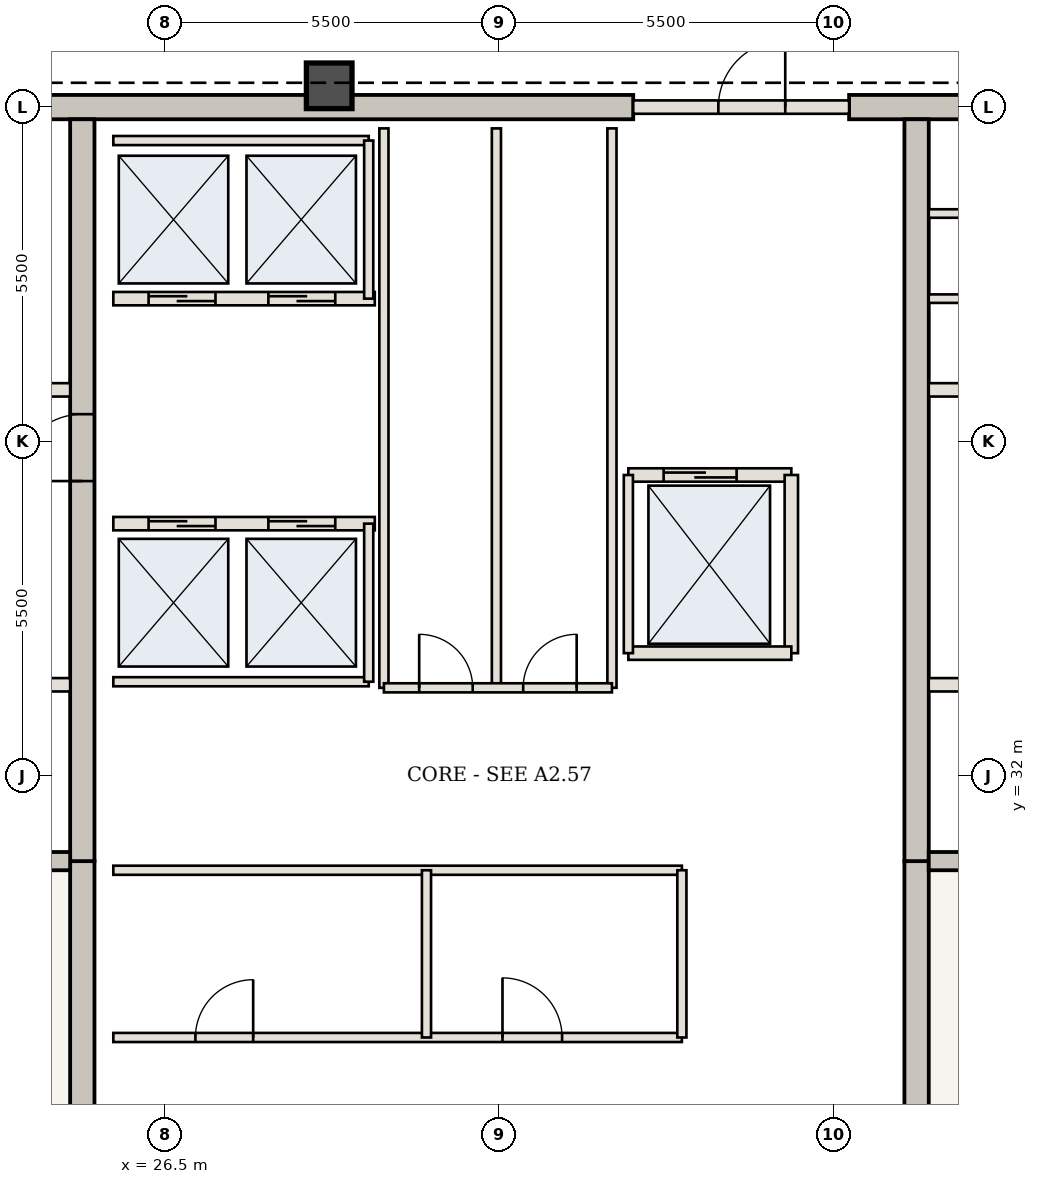
"""IFC4 building model, lengths in metres.
Left out: names, types, materials, properties, quantities, classifications, styles, units other than length and angle.
Written with IfcOpenShell. Run it as: python <this file> out.ifc"""

import sys

from ifc_helpers import new_model, si_unit, direction, frame, frame_2d, origin, origin_2d, place, context, subcontext, project, spatial, rectangle, extrude, element, fill, save


model = new_model("IFC4")
c1 = context("Model", 3, precision=1e-05, world=origin(), true_north=direction((0.0, 1.0)))
c2 = subcontext(c1, "Body", "Model", "MODEL_VIEW")
j1 = project(units=[si_unit("LENGTHUNIT", "METRE"), si_unit("PLANEANGLEUNIT", "RADIAN")], contexts=[c1])
p1 = place(None, origin())
s1 = spatial("IfcSite", under=j1, at=p1, CompositionType="ELEMENT")
p2 = place(p1, origin())
s2 = spatial("IfcBuilding", under=s1, at=p2, CompositionType="ELEMENT")
p3 = place(p2, frame((0.0, 0.0, 257.6)))
s3 = spatial("IfcBuildingStorey", under=s2, at=p3, CompositionType="ELEMENT", Elevation=257.6)
p4 = place(p3, frame((21.41, 43.0, 0.0), z_axis=(0.0, 0.0, 1.0), x_axis=(1.0, 0.0, 0.0)))
e1 = element("IfcWall", 1, at=p4, inside=s3, PredefinedType="SHEAR", context=c2, shape_type="SweptSolid", body=[
    extrude(rectangle(XDim=12.79, YDim=0.4, at=frame_2d((6.395, 0.0))), origin(), (0.0, 0.0, 1.0), 4.55),
])
p5 = place(p3, frame((37.75, 43.0, 0.0), z_axis=(0.0, 0.0, 1.0), x_axis=(1.0, 0.0, 0.0)))
e2 = element("IfcWall", 2, at=p5, inside=s3, PredefinedType="SHEAR", context=c2, shape_type="SweptSolid", body=[
    extrude(rectangle(XDim=4.84, YDim=0.4, at=frame_2d((2.42, 0.0))), origin(), (0.0, 0.0, 1.0), 4.55),
])
p6 = place(p3, frame((25.14, 21.15, 0.0), z_axis=(0.0, 0.0, 1.0), x_axis=(0.0, 1.0, 0.0)))
e3 = element("IfcWall", 3, at=p6, inside=s3, PredefinedType="SHEAR", context=c2, shape_type="SweptSolid", body=[
    extrude(rectangle(XDim=9.45, YDim=0.4, at=frame_2d((4.725, 0.0))), origin(), (0.0, 0.0, 1.0), 4.55),
])
p7 = place(p3, frame((25.14, 30.6, 0.0), z_axis=(0.0, 0.0, 1.0), x_axis=(0.0, 1.0, 0.0)))
e4 = element("IfcWall", 4, at=p7, inside=s3, PredefinedType="SHEAR", context=c2, shape_type="SweptSolid", body=[
    extrude(rectangle(XDim=12.2, YDim=0.4, at=frame_2d((6.1, 0.0))), origin(), (0.0, 0.0, 1.0), 4.55),
])
p8 = place(p7, frame((6.25, 0.0, 0.0)))
e5 = element("IfcOpeningElement", 5, at=p8, cuts=e4, PredefinedType="OPENING", context=c2, shape_type="SweptSolid", body=[
    extrude(rectangle(XDim=1.1, YDim=2.15, at=frame_2d((0.55, 1.075))), frame((0.0, 0.21, 0.0), z_axis=(0.0, -1.0, 0.0), x_axis=(1.0, 0.0, 0.0)), (0.0, 0.0, 1.0), 0.42),
])
p9 = place(p3, frame((38.86, 21.15, 0.0), z_axis=(0.0, 0.0, 1.0), x_axis=(0.0, 1.0, 0.0)))
e6 = element("IfcWall", 6, at=p9, inside=s3, PredefinedType="SHEAR", context=c2, shape_type="SweptSolid", body=[
    extrude(rectangle(XDim=9.45, YDim=0.4, at=frame_2d((4.725, 0.0))), origin(), (0.0, 0.0, 1.0), 4.55),
])
p10 = place(p3, frame((38.86, 30.6, 0.0), z_axis=(0.0, 0.0, 1.0), x_axis=(0.0, 1.0, 0.0)))
e7 = element("IfcWall", 7, at=p10, inside=s3, PredefinedType="SHEAR", context=c2, shape_type="SweptSolid", body=[
    extrude(rectangle(XDim=12.2, YDim=0.4, at=frame_2d((6.1, 0.0))), origin(), (0.0, 0.0, 1.0), 4.55),
])
p11 = place(p3, frame((29.2, 43.35, 0.0), z_axis=(0.0, 0.0, 1.0), x_axis=(1.0, 0.0, 0.0)))
e8 = element("IfcColumn", 8, at=p11, inside=s3, PredefinedType="COLUMN", context=c2, shape_type="SweptSolid", body=[
    extrude(rectangle(XDim=0.75, YDim=0.75, at=origin_2d()), origin(), (0.0, 0.0, 1.0), 4.55),
])
for number, where, z_axis, x_axis in (
    (9, (21.41, 30.6, 0.0), (0.0, 0.0, 1.0), (1.0, 0.0, 0.0)),
    (10, (39.06, 30.6, 0.0), (0.0, 0.0, 1.0), (1.0, 0.0, 0.0)),
):
    element("IfcWall", number, at=place(p3, frame(where, z_axis=z_axis, x_axis=x_axis)), inside=s3, PredefinedType="SHEAR", context=c2, shape_type="SweptSolid", body=[
        extrude(rectangle(XDim=3.53, YDim=0.3, at=frame_2d((1.765, 0.0))), origin(), (0.0, 0.0, 1.0), 4.13),
    ])
p12 = place(p3, frame((21.41, 33.5, 0.0), z_axis=(0.0, 0.0, 1.0), x_axis=(1.0, 0.0, 0.0)))
e11 = element("IfcWall", 11, at=p12, inside=s3, PredefinedType="STANDARD", context=c2, shape_type="SweptSolid", body=[
    extrude(rectangle(XDim=3.53, YDim=0.22, at=frame_2d((1.765, 0.0))), origin(), (0.0, 0.0, 1.0), 4.13),
])
p13 = place(p12, frame((0.75, 0.0, 0.0)))
e12 = element("IfcOpeningElement", 12, at=p13, cuts=e11, PredefinedType="OPENING", context=c2, shape_type="SweptSolid", body=[
    extrude(rectangle(XDim=1.2, YDim=2.2, at=frame_2d((0.6, 1.1))), frame((0.0, 0.12, 0.0), z_axis=(0.0, -1.0, 0.0), x_axis=(1.0, 0.0, 0.0)), (0.0, 0.0, 1.0), 0.24),
])
p14 = place(p3, frame((39.06, 33.5, 0.0), z_axis=(0.0, 0.0, 1.0), x_axis=(1.0, 0.0, 0.0)))
e13 = element("IfcWall", 13, at=p14, inside=s3, PredefinedType="STANDARD", context=c2, shape_type="SweptSolid", body=[
    extrude(rectangle(XDim=3.53, YDim=0.22, at=frame_2d((1.765, 0.0))), origin(), (0.0, 0.0, 1.0), 4.13),
])
p15 = place(p14, frame((1.55, 0.0, 0.0)))
e14 = element("IfcOpeningElement", 14, at=p15, cuts=e13, PredefinedType="OPENING", context=c2, shape_type="SweptSolid", body=[
    extrude(rectangle(XDim=1.2, YDim=2.2, at=frame_2d((0.6, 1.1))), frame((0.0, 0.12, 0.0), z_axis=(0.0, -1.0, 0.0), x_axis=(1.0, 0.0, 0.0)), (0.0, 0.0, 1.0), 0.24),
])
for number, where, z_axis, x_axis in (
    (15, (21.41, 38.35, 0.0), (0.0, 0.0, 1.0), (1.0, 0.0, 0.0)),
    (16, (39.06, 38.35, 0.0), (0.0, 0.0, 1.0), (1.0, 0.0, 0.0)),
):
    element("IfcWall", number, at=place(p3, frame(where, z_axis=z_axis, x_axis=x_axis)), inside=s3, PredefinedType="STANDARD", context=c2, shape_type="SweptSolid", body=[
        extrude(rectangle(XDim=3.53, YDim=0.22, at=frame_2d((1.765, 0.0))), origin(), (0.0, 0.0, 1.0), 4.13),
    ])
for number, where, z_axis, x_axis in (
    (17, (39.06, 39.85, 0.0), (0.0, 0.0, 1.0), (1.0, 0.0, 0.0)),
    (18, (39.06, 41.25, 0.0), (0.0, 0.0, 1.0), (1.0, 0.0, 0.0)),
):
    element("IfcWall", number, at=place(p3, frame(where, z_axis=z_axis, x_axis=x_axis)), inside=s3, PredefinedType="STANDARD", context=c2, shape_type="SweptSolid", body=[
        extrude(rectangle(XDim=3.53, YDim=0.14, at=frame_2d((1.765, 0.0))), origin(), (0.0, 0.0, 1.0), 4.13),
    ])
p16 = place(p3, frame((25.65, 27.7, 0.0), z_axis=(0.0, 0.0, 1.0), x_axis=(1.0, 0.0, 0.0)))
e19 = element("IfcWall", 19, at=p16, inside=s3, PredefinedType="STANDARD", context=c2, shape_type="SweptSolid", body=[
    extrude(rectangle(XDim=9.35, YDim=0.15, at=frame_2d((4.675, 0.0))), origin(), (0.0, 0.0, 1.0), 4.13),
])
p17 = place(p16, frame((1.35, 0.0, 0.0)))
e20 = element("IfcOpeningElement", 20, at=p17, cuts=e19, PredefinedType="OPENING", context=c2, shape_type="SweptSolid", body=[
    extrude(rectangle(XDim=0.95, YDim=2.15, at=frame_2d((0.475, 1.075))), frame((0.0, 0.085, 0.0), z_axis=(0.0, -1.0, 0.0), x_axis=(1.0, 0.0, 0.0)), (0.0, 0.0, 1.0), 0.17),
])
p18 = place(p16, frame((6.4, 0.0, 0.0)))
e21 = element("IfcOpeningElement", 21, at=p18, cuts=e19, PredefinedType="OPENING", context=c2, shape_type="SweptSolid", body=[
    extrude(rectangle(XDim=0.98, YDim=2.2, at=frame_2d((0.49, 1.1))), frame((0.0, 0.085, 0.0), z_axis=(0.0, -1.0, 0.0), x_axis=(1.0, 0.0, 0.0)), (0.0, 0.0, 1.0), 0.17),
])
p19 = place(p3, frame((25.65, 30.45, 0.0), z_axis=(0.0, 0.0, 1.0), x_axis=(1.0, 0.0, 0.0)))
e22 = element("IfcWall", 22, at=p19, inside=s3, PredefinedType="STANDARD", context=c2, shape_type="SweptSolid", body=[
    extrude(rectangle(XDim=9.35, YDim=0.15, at=frame_2d((4.675, 0.0))), origin(), (0.0, 0.0, 1.0), 4.13),
])
for number, where, z_axis, x_axis in (
    (23, (30.8, 27.7, 0.0), (0.0, 0.0, 1.0), (0.0, 1.0, 0.0)),
    (24, (35.0, 27.7, 0.0), (0.0, 0.0, 1.0), (0.0, 1.0, 0.0)),
):
    element("IfcWall", number, at=place(p3, frame(where, z_axis=z_axis, x_axis=x_axis)), inside=s3, PredefinedType="STANDARD", context=c2, shape_type="SweptSolid", body=[
        extrude(rectangle(XDim=2.75, YDim=0.15, at=frame_2d((1.375, 0.0))), origin(), (0.0, 0.0, 1.0), 4.13),
    ])
p20 = place(p3, frame((25.65, 36.15, 0.0), z_axis=(0.0, 0.0, 1.0), x_axis=(1.0, 0.0, 0.0)))
e25 = element("IfcWall", 25, at=p20, inside=s3, PredefinedType="STANDARD", context=c2, shape_type="SweptSolid", body=[
    extrude(rectangle(XDim=4.3, YDim=0.22, at=frame_2d((2.15, 0.0))), origin(), (0.0, 0.0, 1.0), 4.13),
])
p21 = place(p20, frame((0.58, 0.0, 0.0)))
e26 = element("IfcOpeningElement", 26, at=p21, cuts=e25, PredefinedType="OPENING", context=c2, shape_type="SweptSolid", body=[
    extrude(rectangle(XDim=1.1, YDim=2.15, at=frame_2d((0.55, 1.075))), frame((0.0, 0.12, 0.0), z_axis=(0.0, -1.0, 0.0), x_axis=(1.0, 0.0, 0.0)), (0.0, 0.0, 1.0), 0.24),
])
p22 = place(p20, frame((2.55, 0.0, 0.0)))
e27 = element("IfcOpeningElement", 27, at=p22, cuts=e25, PredefinedType="OPENING", context=c2, shape_type="SweptSolid", body=[
    extrude(rectangle(XDim=1.1, YDim=2.15, at=frame_2d((0.55, 1.075))), frame((0.0, 0.12, 0.0), z_axis=(0.0, -1.0, 0.0), x_axis=(1.0, 0.0, 0.0)), (0.0, 0.0, 1.0), 0.24),
])
p23 = place(p3, frame((25.65, 33.55, 0.0), z_axis=(0.0, 0.0, 1.0), x_axis=(1.0, 0.0, 0.0)))
e28 = element("IfcWall", 28, at=p23, inside=s3, PredefinedType="STANDARD", context=c2, shape_type="SweptSolid", body=[
    extrude(rectangle(XDim=4.2, YDim=0.15, at=frame_2d((2.1, 0.0))), origin(), (0.0, 0.0, 1.0), 4.13),
])
p24 = place(p3, frame((29.85, 33.55, 0.0), z_axis=(0.0, 0.0, 1.0), x_axis=(0.0, 1.0, 0.0)))
e29 = element("IfcWall", 29, at=p24, inside=s3, PredefinedType="STANDARD", context=c2, shape_type="SweptSolid", body=[
    extrude(rectangle(XDim=2.6, YDim=0.15, at=frame_2d((1.3, 0.0))), origin(), (0.0, 0.0, 1.0), 4.13),
])
p25 = place(p3, frame((25.65, 39.85, 0.0), z_axis=(0.0, 0.0, 1.0), x_axis=(1.0, 0.0, 0.0)))
e30 = element("IfcWall", 30, at=p25, inside=s3, PredefinedType="STANDARD", context=c2, shape_type="SweptSolid", body=[
    extrude(rectangle(XDim=4.3, YDim=0.22, at=frame_2d((2.15, 0.0))), origin(), (0.0, 0.0, 1.0), 4.13),
])
p26 = place(p25, frame((0.58, 0.0, 0.0)))
e31 = element("IfcOpeningElement", 31, at=p26, cuts=e30, PredefinedType="OPENING", context=c2, shape_type="SweptSolid", body=[
    extrude(rectangle(XDim=1.1, YDim=2.15, at=frame_2d((0.55, 1.075))), frame((0.0, 0.12, 0.0), z_axis=(0.0, -1.0, 0.0), x_axis=(1.0, 0.0, 0.0)), (0.0, 0.0, 1.0), 0.24),
])
p27 = place(p25, frame((2.55, 0.0, 0.0)))
e32 = element("IfcOpeningElement", 32, at=p27, cuts=e30, PredefinedType="OPENING", context=c2, shape_type="SweptSolid", body=[
    extrude(rectangle(XDim=1.1, YDim=2.15, at=frame_2d((0.55, 1.075))), frame((0.0, 0.12, 0.0), z_axis=(0.0, -1.0, 0.0), x_axis=(1.0, 0.0, 0.0)), (0.0, 0.0, 1.0), 0.24),
])
p28 = place(p3, frame((25.65, 42.45, 0.0), z_axis=(0.0, 0.0, 1.0), x_axis=(1.0, 0.0, 0.0)))
e33 = element("IfcWall", 33, at=p28, inside=s3, PredefinedType="STANDARD", context=c2, shape_type="SweptSolid", body=[
    extrude(rectangle(XDim=4.2, YDim=0.15, at=frame_2d((2.1, 0.0))), origin(), (0.0, 0.0, 1.0), 4.13),
])
p29 = place(p3, frame((29.85, 39.85, 0.0), z_axis=(0.0, 0.0, 1.0), x_axis=(0.0, 1.0, 0.0)))
e34 = element("IfcWall", 34, at=p29, inside=s3, PredefinedType="STANDARD", context=c2, shape_type="SweptSolid", body=[
    extrude(rectangle(XDim=2.6, YDim=0.15, at=frame_2d((1.3, 0.0))), origin(), (0.0, 0.0, 1.0), 4.13),
])
for number, where, z_axis, x_axis in (
    (35, (30.1, 33.45, 0.0), (0.0, 0.0, 1.0), (0.0, 1.0, 0.0)),
    (36, (31.95, 33.45, 0.0), (0.0, 0.0, 1.0), (0.0, 1.0, 0.0)),
    (37, (33.85, 33.45, 0.0), (0.0, 0.0, 1.0), (0.0, 1.0, 0.0)),
):
    element("IfcWall", number, at=place(p3, frame(where, z_axis=z_axis, x_axis=x_axis)), inside=s3, PredefinedType="STANDARD", context=c2, shape_type="SweptSolid", body=[
        extrude(rectangle(XDim=9.2, YDim=0.15, at=frame_2d((4.6, 0.0))), origin(), (0.0, 0.0, 1.0), 4.13),
    ])
p30 = place(p3, frame((30.1, 33.45, 0.0), z_axis=(0.0, 0.0, 1.0), x_axis=(1.0, 0.0, 0.0)))
e38 = element("IfcWall", 38, at=p30, inside=s3, PredefinedType="STANDARD", context=c2, shape_type="SweptSolid", body=[
    extrude(rectangle(XDim=3.75, YDim=0.15, at=frame_2d((1.875, 0.0))), origin(), (0.0, 0.0, 1.0), 4.13),
])
p31 = place(p30, frame((0.58, 0.0, 0.0)))
e39 = element("IfcOpeningElement", 39, at=p31, cuts=e38, PredefinedType="OPENING", context=c2, shape_type="SweptSolid", body=[
    extrude(rectangle(XDim=0.88, YDim=2.1, at=frame_2d((0.44, 1.05))), frame((0.0, 0.085, 0.0), z_axis=(0.0, -1.0, 0.0), x_axis=(1.0, 0.0, 0.0)), (0.0, 0.0, 1.0), 0.17),
])
p32 = place(p30, frame((2.29, 0.0, 0.0)))
e40 = element("IfcOpeningElement", 40, at=p32, cuts=e38, PredefinedType="OPENING", context=c2, shape_type="SweptSolid", body=[
    extrude(rectangle(XDim=0.88, YDim=2.1, at=frame_2d((0.44, 1.05))), frame((0.0, 0.085, 0.0), z_axis=(0.0, -1.0, 0.0), x_axis=(1.0, 0.0, 0.0)), (0.0, 0.0, 1.0), 0.17),
])
p33 = place(p3, frame((34.2, 43.0, 0.0), z_axis=(0.0, 0.0, 1.0), x_axis=(1.0, 0.0, 0.0)))
e41 = element("IfcWall", 41, at=p33, inside=s3, PredefinedType="STANDARD", context=c2, shape_type="SweptSolid", body=[
    extrude(rectangle(XDim=3.55, YDim=0.22, at=frame_2d((1.775, 0.0))), origin(), (0.0, 0.0, 1.0), 4.13),
])
p34 = place(p33, frame((1.4, 0.0, 0.0)))
e42 = element("IfcOpeningElement", 42, at=p34, cuts=e41, PredefinedType="OPENING", context=c2, shape_type="SweptSolid", body=[
    extrude(rectangle(XDim=1.1, YDim=2.15, at=frame_2d((0.55, 1.075))), frame((0.0, 0.12, 0.0), z_axis=(0.0, -1.0, 0.0), x_axis=(1.0, 0.0, 0.0)), (0.0, 0.0, 1.0), 0.24),
])
p35 = place(p3, frame((34.12, 36.95, 0.0), z_axis=(0.0, 0.0, 1.0), x_axis=(1.0, 0.0, 0.0)))
e43 = element("IfcWall", 43, at=p35, inside=s3, PredefinedType="STANDARD", context=c2, shape_type="SweptSolid", body=[
    extrude(rectangle(XDim=2.68, YDim=0.22, at=frame_2d((1.34, 0.0))), origin(), (0.0, 0.0, 1.0), 4.13),
])
p36 = place(p35, frame((0.58, 0.0, 0.0)))
e44 = element("IfcOpeningElement", 44, at=p36, cuts=e43, PredefinedType="OPENING", context=c2, shape_type="SweptSolid", body=[
    extrude(rectangle(XDim=1.2, YDim=2.2, at=frame_2d((0.6, 1.1))), frame((0.0, 0.12, 0.0), z_axis=(0.0, -1.0, 0.0), x_axis=(1.0, 0.0, 0.0)), (0.0, 0.0, 1.0), 0.24),
])
p37 = place(p3, frame((36.8, 34.02, 0.0), z_axis=(0.0, 0.0, 1.0), x_axis=(0.0, 1.0, 0.0)))
e45 = element("IfcWall", 45, at=p37, inside=s3, PredefinedType="STANDARD", context=c2, shape_type="SweptSolid", body=[
    extrude(rectangle(XDim=2.93, YDim=0.22, at=frame_2d((1.465, 0.0))), origin(), (0.0, 0.0, 1.0), 4.13),
])
p38 = place(p3, frame((34.12, 34.02, 0.0), z_axis=(0.0, 0.0, 1.0), x_axis=(1.0, 0.0, 0.0)))
e46 = element("IfcWall", 46, at=p38, inside=s3, PredefinedType="STANDARD", context=c2, shape_type="SweptSolid", body=[
    extrude(rectangle(XDim=2.68, YDim=0.22, at=frame_2d((1.34, 0.0))), origin(), (0.0, 0.0, 1.0), 4.13),
])
p39 = place(p3, frame((34.12, 34.02, 0.0), z_axis=(0.0, 0.0, 1.0), x_axis=(0.0, 1.0, 0.0)))
e47 = element("IfcWall", 47, at=p39, inside=s3, PredefinedType="STANDARD", context=c2, shape_type="SweptSolid", body=[
    extrude(rectangle(XDim=2.93, YDim=0.15, at=frame_2d((1.465, 0.0))), origin(), (0.0, 0.0, 1.0), 4.13),
])
p40 = place(p8, origin())
e48 = element("IfcDoor", 48, at=p40, inside=s3, OperationType="SINGLE_SWING_LEFT", PredefinedType="DOOR", context=c2, shape_type="SweptSolid", body=[
    extrude(rectangle(XDim=1.1, YDim=2.15, at=frame_2d((0.55, 1.075))), frame((0.0, 0.025, 0.0), z_axis=(0.0, -1.0, 0.0), x_axis=(1.0, 0.0, 0.0)), (0.0, 0.0, 1.0), 0.05),
])
fill(e5, e48)
p41 = place(p17, origin())
e49 = element("IfcDoor", 49, at=p41, inside=s3, OperationType="SINGLE_SWING_RIGHT", PredefinedType="DOOR", context=c2, shape_type="SweptSolid", body=[
    extrude(rectangle(XDim=0.95, YDim=2.15, at=frame_2d((0.475, 1.075))), frame((0.0, 0.025, 0.0), z_axis=(0.0, -1.0, 0.0), x_axis=(1.0, 0.0, 0.0)), (0.0, 0.0, 1.0), 0.05),
])
fill(e20, e49)
p42 = place(p18, origin())
e50 = element("IfcDoor", 50, at=p42, inside=s3, OperationType="SINGLE_SWING_LEFT", PredefinedType="DOOR", context=c2, shape_type="SweptSolid", body=[
    extrude(rectangle(XDim=0.98, YDim=2.2, at=frame_2d((0.49, 1.1))), frame((0.0, 0.025, 0.0), z_axis=(0.0, -1.0, 0.0), x_axis=(1.0, 0.0, 0.0)), (0.0, 0.0, 1.0), 0.05),
])
fill(e21, e50)
p43 = place(p21, origin())
e51 = element("IfcDoor", 51, at=p43, inside=s3, OperationType="DOUBLE_DOOR_SLIDING", PredefinedType="DOOR", context=c2, shape_type="SweptSolid", body=[
    extrude(rectangle(XDim=1.1, YDim=2.15, at=frame_2d((0.55, 1.075))), frame((0.0, 0.025, 0.0), z_axis=(0.0, -1.0, 0.0), x_axis=(1.0, 0.0, 0.0)), (0.0, 0.0, 1.0), 0.05),
])
fill(e26, e51)
p44 = place(p22, origin())
e52 = element("IfcDoor", 52, at=p44, inside=s3, OperationType="DOUBLE_DOOR_SLIDING", PredefinedType="DOOR", context=c2, shape_type="SweptSolid", body=[
    extrude(rectangle(XDim=1.1, YDim=2.15, at=frame_2d((0.55, 1.075))), frame((0.0, 0.025, 0.0), z_axis=(0.0, -1.0, 0.0), x_axis=(1.0, 0.0, 0.0)), (0.0, 0.0, 1.0), 0.05),
])
fill(e27, e52)
p45 = place(p26, origin())
e53 = element("IfcDoor", 53, at=p45, inside=s3, OperationType="DOUBLE_DOOR_SLIDING", PredefinedType="DOOR", context=c2, shape_type="SweptSolid", body=[
    extrude(rectangle(XDim=1.1, YDim=2.15, at=frame_2d((0.55, 1.075))), frame((0.0, 0.025, 0.0), z_axis=(0.0, -1.0, 0.0), x_axis=(1.0, 0.0, 0.0)), (0.0, 0.0, 1.0), 0.05),
])
fill(e31, e53)
p46 = place(p27, origin())
e54 = element("IfcDoor", 54, at=p46, inside=s3, OperationType="DOUBLE_DOOR_SLIDING", PredefinedType="DOOR", context=c2, shape_type="SweptSolid", body=[
    extrude(rectangle(XDim=1.1, YDim=2.15, at=frame_2d((0.55, 1.075))), frame((0.0, 0.025, 0.0), z_axis=(0.0, -1.0, 0.0), x_axis=(1.0, 0.0, 0.0)), (0.0, 0.0, 1.0), 0.05),
])
fill(e32, e54)
p47 = place(p31, origin())
e55 = element("IfcDoor", 55, at=p47, inside=s3, OperationType="SINGLE_SWING_LEFT", PredefinedType="DOOR", context=c2, shape_type="SweptSolid", body=[
    extrude(rectangle(XDim=0.88, YDim=2.1, at=frame_2d((0.44, 1.05))), frame((0.0, 0.025, 0.0), z_axis=(0.0, -1.0, 0.0), x_axis=(1.0, 0.0, 0.0)), (0.0, 0.0, 1.0), 0.05),
])
fill(e39, e55)
p48 = place(p32, origin())
e56 = element("IfcDoor", 56, at=p48, inside=s3, OperationType="SINGLE_SWING_RIGHT", PredefinedType="DOOR", context=c2, shape_type="SweptSolid", body=[
    extrude(rectangle(XDim=0.88, YDim=2.1, at=frame_2d((0.44, 1.05))), frame((0.0, 0.025, 0.0), z_axis=(0.0, -1.0, 0.0), x_axis=(1.0, 0.0, 0.0)), (0.0, 0.0, 1.0), 0.05),
])
fill(e40, e56)
p49 = place(p34, origin())
e57 = element("IfcDoor", 57, at=p49, inside=s3, OperationType="SINGLE_SWING_RIGHT", PredefinedType="DOOR", context=c2, shape_type="SweptSolid", body=[
    extrude(rectangle(XDim=1.1, YDim=2.15, at=frame_2d((0.55, 1.075))), frame((0.0, 0.025, 0.0), z_axis=(0.0, -1.0, 0.0), x_axis=(1.0, 0.0, 0.0)), (0.0, 0.0, 1.0), 0.05),
])
fill(e42, e57)
p50 = place(p36, origin())
e58 = element("IfcDoor", 58, at=p50, inside=s3, OperationType="DOUBLE_DOOR_SLIDING", PredefinedType="DOOR", context=c2, shape_type="SweptSolid", body=[
    extrude(rectangle(XDim=1.2, YDim=2.2, at=frame_2d((0.6, 1.1))), frame((0.0, 0.025, 0.0), z_axis=(0.0, -1.0, 0.0), x_axis=(1.0, 0.0, 0.0)), (0.0, 0.0, 1.0), 0.05),
])
fill(e44, e58)
save(model, sys.argv[1])
